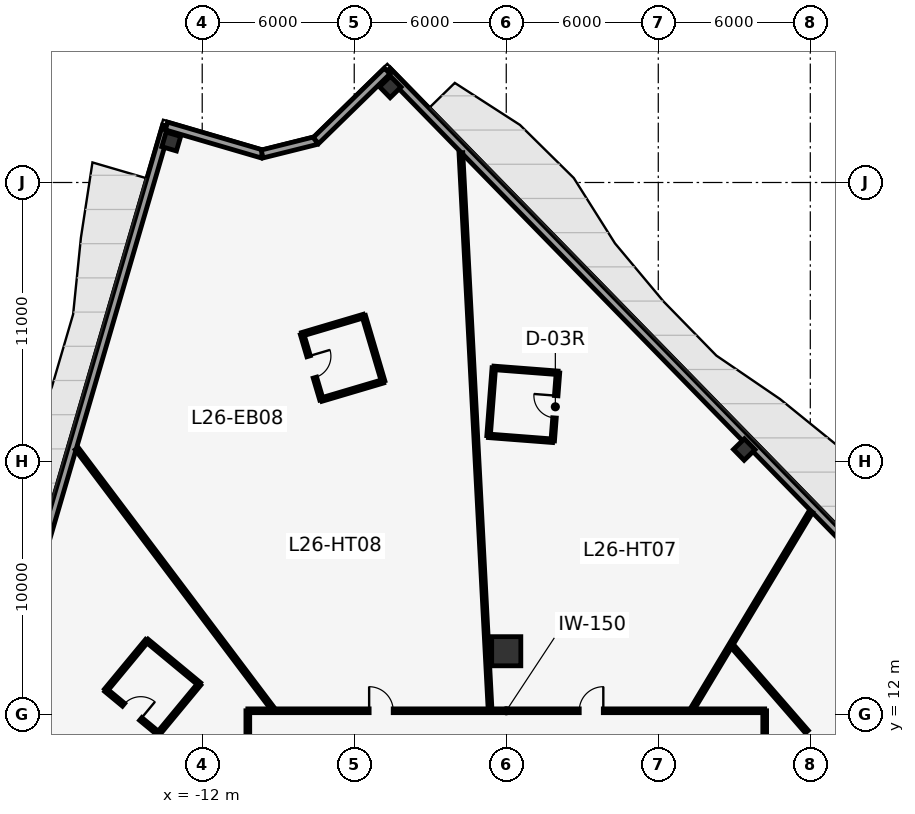
"""IFC4 building model, lengths in metres.
Left out: names, types, materials, properties, quantities, classifications, styles, units other than length and angle.
Written with IfcOpenShell. Run it as: python <this file> out.ifc"""

import sys

from ifc_helpers import new_model, si_unit, direction, frame, frame_2d, origin, origin_2d, place, context, subcontext, project, spatial, rectangle, hollow_rectangle, extrude, element, fill, save


model = new_model("IFC4")
c1 = context("Model", 3, precision=1e-05, world=origin(), true_north=direction((0.0, 1.0)))
c2 = subcontext(c1, "Body", "Model", "MODEL_VIEW")
j1 = project(units=[si_unit("LENGTHUNIT", "METRE"), si_unit("PLANEANGLEUNIT", "RADIAN")], contexts=[c1])
p1 = place(None, origin())
s1 = spatial("IfcSite", under=j1, at=p1, CompositionType="ELEMENT")
p2 = place(p1, origin())
s2 = spatial("IfcBuilding", under=s1, at=p2, CompositionType="ELEMENT")
p3 = place(p2, frame((0.0, 0.0, 115.0)))
s3 = spatial("IfcBuildingStorey", under=s2, at=p3, CompositionType="ELEMENT", Elevation=115.0)
p4 = place(p3, frame((0.0, 14.5, 0.0), z_axis=(0.0, 0.0, 1.0), x_axis=(1.0, 0.0, 0.0)))
e1 = element("IfcColumn", 1, at=p4, inside=s3, PredefinedType="COLUMN", context=c2, shape_type="SweptSolid", body=[
    extrude(rectangle(XDim=1.15, YDim=1.15, at=origin_2d()), origin(), (0.0, 0.0, 1.0), 4.0),
])
for number, where, z_axis, x_axis in (
    (2, (-13.221, 34.617, 0.0), (0.0, 0.0, 1.0), (0.281, 0.96, 0.0)),
    (3, (9.394, 22.461, 0.0), (0.0, 0.0, 1.0), (-0.699, 0.716, 0.0)),
    (4, (-4.578, 36.772, 0.0), (0.0, 0.0, 1.0), (-0.699, 0.716, 0.0)),
):
    element("IfcColumn", number, at=place(p3, frame(where, z_axis=z_axis, x_axis=x_axis)), inside=s3, PredefinedType="COLUMN", context=c2, shape_type="SweptSolid", body=[
        extrude(hollow_rectangle(XDim=0.6, YDim=0.6, WallThickness=0.04, at=origin_2d()), origin(), (0.0, 0.0, 1.0), 4.0),
    ])
p5 = place(p3, frame((-4.698, 37.402, 0.0), z_axis=(0.0, 0.0, 1.0), x_axis=(0.698490621109, -0.715619208954, 0.0)))
e5 = element("IfcWall", 5, at=p5, inside=s3, PredefinedType="STANDARD", context=c2, shape_type="SweptSolid", body=[
    extrude(rectangle(XDim=61.076, YDim=0.32, at=frame_2d((30.538, 0.0))), origin(), (0.0, 0.0, 1.0), 3.75),
])
p6 = place(p5, frame((30.038, 0.0, 0.0)))
e6 = element("IfcOpeningElement", 6, at=p6, cuts=e5, PredefinedType="OPENING", context=c2, shape_type="SweptSolid", body=[
    extrude(rectangle(XDim=1.0, YDim=2.15, at=frame_2d((0.5, 1.075))), frame((0.0, 0.17, 0.0), z_axis=(0.0, -1.0, 0.0), x_axis=(1.0, 0.0, 0.0)), (0.0, 0.0, 1.0), 0.34),
])
p7 = place(p3, frame((-30.559, -23.389, 0.0), z_axis=(0.0, 0.0, 1.0), x_axis=(0.280769703207, 0.95977516834, 0.0)))
e7 = element("IfcWall", 7, at=p7, inside=s3, PredefinedType="STANDARD", context=c2, shape_type="SweptSolid", body=[
    extrude(rectangle(XDim=61.076, YDim=0.32, at=frame_2d((30.538, 0.0))), origin(), (0.0, 0.0, 1.0), 3.75),
])
p8 = place(p7, frame((30.038, 0.0, 0.0)))
e8 = element("IfcOpeningElement", 8, at=p8, cuts=e7, PredefinedType="OPENING", context=c2, shape_type="SweptSolid", body=[
    extrude(rectangle(XDim=1.0, YDim=2.15, at=frame_2d((0.5, 1.075))), frame((0.0, 0.17, 0.0), z_axis=(0.0, -1.0, 0.0), x_axis=(1.0, 0.0, 0.0)), (0.0, 0.0, 1.0), 0.34),
])
p9 = place(p3, frame((-13.411, 35.229, 0.0), z_axis=(0.0, 0.0, 1.0), x_axis=(0.959788404321, -0.280724453747, 0.0)))
e9 = element("IfcWall", 9, at=p9, inside=s3, PredefinedType="STANDARD", context=c2, shape_type="SweptSolid", body=[
    extrude(rectangle(XDim=3.934, YDim=0.32, at=frame_2d((1.967, 0.0))), origin(), (0.0, 0.0, 1.0), 3.75),
])
p10 = place(p3, frame((-9.635, 34.125, 0.0), z_axis=(0.0, 0.0, 1.0), x_axis=(0.970306423964, 0.241878985475, 0.0)))
e10 = element("IfcWall", 10, at=p10, inside=s3, PredefinedType="STANDARD", context=c2, shape_type="SweptSolid", body=[
    extrude(rectangle(XDim=2.187, YDim=0.32, at=frame_2d((1.094, 0.0))), origin(), (0.0, 0.0, 1.0), 3.75),
])
p11 = place(p3, frame((-7.513, 34.654, 0.0), z_axis=(0.0, 0.0, 1.0), x_axis=(0.715620001602, 0.698489809022, 0.0)))
e11 = element("IfcWall", 11, at=p11, inside=s3, PredefinedType="STANDARD", context=c2, shape_type="SweptSolid", body=[
    extrude(rectangle(XDim=3.934, YDim=0.32, at=frame_2d((1.967, 0.0))), origin(), (0.0, 0.0, 1.0), 3.75),
])
p12 = place(p3, frame((-10.2, 12.15, 0.0), z_axis=(0.0, 0.0, 1.0), x_axis=(1.0, 0.0, 0.0)))
e12 = element("IfcWall", 12, at=p12, inside=s3, PredefinedType="PARTITIONING", context=c2, shape_type="SweptSolid", body=[
    extrude(rectangle(XDim=20.4, YDim=0.15, at=frame_2d((10.2, 0.0))), origin(), (0.0, 0.0, 1.0), 3.75),
])
p13 = place(p12, frame((13.081, 0.0, 0.0)))
e13 = element("IfcOpeningElement", 13, at=p13, cuts=e12, PredefinedType="OPENING", context=c2, shape_type="SweptSolid", body=[
    extrude(rectangle(XDim=0.95, YDim=2.15, at=frame_2d((0.475, 1.075))), frame((0.0, 0.085, 0.0), z_axis=(0.0, -1.0, 0.0), x_axis=(1.0, 0.0, 0.0)), (0.0, 0.0, 1.0), 0.17),
])
p14 = place(p12, frame((4.788, 0.0, 0.0)))
e14 = element("IfcOpeningElement", 14, at=p14, cuts=e12, PredefinedType="OPENING", context=c2, shape_type="SweptSolid", body=[
    extrude(rectangle(XDim=0.95, YDim=2.15, at=frame_2d((0.475, 1.075))), frame((0.0, 0.085, 0.0), z_axis=(0.0, -1.0, 0.0), x_axis=(1.0, 0.0, 0.0)), (0.0, 0.0, 1.0), 0.17),
])
p15 = place(p3, frame((10.2, 12.15, 0.0), z_axis=(0.0, 0.0, 1.0), x_axis=(0.0, -1.0, 0.0)))
e15 = element("IfcWall", 15, at=p15, inside=s3, PredefinedType="PARTITIONING", context=c2, shape_type="SweptSolid", body=[
    extrude(rectangle(XDim=24.0, YDim=0.15, at=frame_2d((12.0, 0.0))), origin(), (0.0, 0.0, 1.0), 3.75),
])
p16 = place(p15, frame((17.299, 0.0, 0.0)))
e16 = element("IfcOpeningElement", 16, at=p16, cuts=e15, PredefinedType="OPENING", context=c2, shape_type="SweptSolid", body=[
    extrude(rectangle(XDim=0.95, YDim=2.15, at=frame_2d((0.475, 1.075))), frame((0.0, 0.085, 0.0), z_axis=(0.0, -1.0, 0.0), x_axis=(1.0, 0.0, 0.0)), (0.0, 0.0, 1.0), 0.17),
])
p17 = place(p15, frame((10.092, 0.0, 0.0)))
e17 = element("IfcOpeningElement", 17, at=p17, cuts=e15, PredefinedType="OPENING", context=c2, shape_type="SweptSolid", body=[
    extrude(rectangle(XDim=0.95, YDim=2.15, at=frame_2d((0.475, 1.075))), frame((0.0, 0.085, 0.0), z_axis=(0.0, -1.0, 0.0), x_axis=(1.0, 0.0, 0.0)), (0.0, 0.0, 1.0), 0.17),
])
p18 = place(p15, frame((3.327, 0.0, 0.0)))
e18 = element("IfcOpeningElement", 18, at=p18, cuts=e15, PredefinedType="OPENING", context=c2, shape_type="SweptSolid", body=[
    extrude(rectangle(XDim=0.95, YDim=2.15, at=frame_2d((0.475, 1.075))), frame((0.0, 0.085, 0.0), z_axis=(0.0, -1.0, 0.0), x_axis=(1.0, 0.0, 0.0)), (0.0, 0.0, 1.0), 0.17),
])
p19 = place(p3, frame((-10.2, -11.85, 0.0), z_axis=(0.0, 0.0, 1.0), x_axis=(0.0, 1.0, 0.0)))
e19 = element("IfcWall", 19, at=p19, inside=s3, PredefinedType="PARTITIONING", context=c2, shape_type="SweptSolid", body=[
    extrude(rectangle(XDim=24.0, YDim=0.15, at=frame_2d((12.0, 0.0))), origin(), (0.0, 0.0, 1.0), 3.75),
])
p20 = place(p19, frame((5.187, 0.0, 0.0)))
e20 = element("IfcOpeningElement", 20, at=p20, cuts=e19, PredefinedType="OPENING", context=c2, shape_type="SweptSolid", body=[
    extrude(rectangle(XDim=0.95, YDim=2.15, at=frame_2d((0.475, 1.075))), frame((0.0, 0.085, 0.0), z_axis=(0.0, -1.0, 0.0), x_axis=(1.0, 0.0, 0.0)), (0.0, 0.0, 1.0), 0.17),
])
p21 = place(p19, frame((19.094, 0.0, 0.0)))
e21 = element("IfcOpeningElement", 21, at=p21, cuts=e19, PredefinedType="OPENING", context=c2, shape_type="SweptSolid", body=[
    extrude(rectangle(XDim=0.95, YDim=2.15, at=frame_2d((0.475, 1.075))), frame((0.0, 0.085, 0.0), z_axis=(0.0, -1.0, 0.0), x_axis=(1.0, 0.0, 0.0)), (0.0, 0.0, 1.0), 0.17),
])
p22 = place(p19, frame((11.767, 0.0, 0.0)))
e22 = element("IfcOpeningElement", 22, at=p22, cuts=e19, PredefinedType="OPENING", context=c2, shape_type="SweptSolid", body=[
    extrude(rectangle(XDim=0.95, YDim=2.15, at=frame_2d((0.475, 1.075))), frame((0.0, 0.085, 0.0), z_axis=(0.0, -1.0, 0.0), x_axis=(1.0, 0.0, 0.0)), (0.0, 0.0, 1.0), 0.17),
])
p23 = place(p3, frame((7.364, 12.255, 0.0), z_axis=(0.0, 0.0, 1.0), x_axis=(0.515030961147, 0.857171575042, 0.0)))
e23 = element("IfcWall", 23, at=p23, inside=s3, PredefinedType="PARTITIONING", context=c2, shape_type="SweptSolid", body=[
    extrude(rectangle(XDim=9.054, YDim=0.15, at=frame_2d((4.527, 0.0))), origin(), (0.0, 0.0, 1.0), 3.75),
])
p24 = place(p3, frame((-0.642, 12.255, 0.0), z_axis=(0.0, 0.0, 1.0), x_axis=(-0.052336972547, 0.998629481492, 0.0)))
e24 = element("IfcWall", 24, at=p24, inside=s3, PredefinedType="PARTITIONING", context=c2, shape_type="SweptSolid", body=[
    extrude(rectangle(XDim=21.948, YDim=0.15, at=frame_2d((10.974, 0.0))), origin(), (0.0, 0.0, 1.0), 2.798),
])
p25 = place(p3, frame((-9.235, 12.255, 0.0), z_axis=(0.0, 0.0, 1.0), x_axis=(-0.60180765782, 0.79864106017, 0.0)))
e25 = element("IfcWall", 25, at=p25, inside=s3, PredefinedType="PARTITIONING", context=c2, shape_type="SweptSolid", body=[
    extrude(rectangle(XDim=12.825, YDim=0.15, at=frame_2d((6.413, 0.0))), origin(), (0.0, 0.0, 1.0), 3.75),
])
p26 = place(p3, frame((15.428, 7.222, 0.0), z_axis=(0.0, 0.0, 1.0), x_axis=(-0.656028314667, 0.75473627868, 0.0)))
e26 = element("IfcWall", 26, at=p26, inside=s3, PredefinedType="PARTITIONING", context=c2, shape_type="SweptSolid", body=[
    extrude(rectangle(XDim=9.968, YDim=0.15, at=frame_2d((4.984, 0.0))), origin(), (0.0, 0.0, 1.0), 3.75),
])
p27 = place(p26, frame((4.534, 0.0, 0.0)))
e27 = element("IfcOpeningElement", 27, at=p27, cuts=e26, PredefinedType="OPENING", context=c2, shape_type="SweptSolid", body=[
    extrude(rectangle(XDim=0.9, YDim=2.1, at=frame_2d((0.45, 1.05))), frame((0.0, 0.085, 0.0), z_axis=(0.0, -1.0, 0.0), x_axis=(1.0, 0.0, 0.0)), (0.0, 0.0, 1.0), 0.17),
])
p28 = place(p3, frame((1.834, 22.806, 0.0), z_axis=(0.0, 0.0, 1.0), x_axis=(0.076696498885, 0.997054485502, 0.0)))
e28 = element("IfcWall", 28, at=p28, inside=s3, PredefinedType="PARTITIONING", context=c2, shape_type="SweptSolid", body=[
    extrude(rectangle(XDim=2.69, YDim=0.14, at=frame_2d((1.345, 0.0))), origin(), (0.0, 0.0, 1.0), 3.75),
])
p29 = place(p28, frame((0.905, 0.0, 0.0)))
e29 = element("IfcOpeningElement", 29, at=p29, cuts=e28, PredefinedType="OPENING", context=c2, shape_type="SweptSolid", body=[
    extrude(rectangle(XDim=0.88, YDim=2.1, at=frame_2d((0.44, 1.05))), frame((0.0, 0.08, 0.0), z_axis=(0.0, -1.0, 0.0), x_axis=(1.0, 0.0, 0.0)), (0.0, 0.0, 1.0), 0.16),
])
p30 = place(p3, frame((2.041, 25.488, 0.0), z_axis=(0.0, 0.0, 1.0), x_axis=(-0.997046564476, 0.076799402778, 0.0)))
e30 = element("IfcWall", 30, at=p30, inside=s3, PredefinedType="PARTITIONING", context=c2, shape_type="SweptSolid", body=[
    extrude(rectangle(XDim=2.54, YDim=0.14, at=frame_2d((1.27, 0.0))), origin(), (0.0, 0.0, 1.0), 3.75),
])
p31 = place(p3, frame((-0.492, 25.683, 0.0), z_axis=(0.0, 0.0, 1.0), x_axis=(-0.076689558651, -0.997055019341, 0.0)))
e31 = element("IfcWall", 31, at=p31, inside=s3, PredefinedType="PARTITIONING", context=c2, shape_type="SweptSolid", body=[
    extrude(rectangle(XDim=2.69, YDim=0.14, at=frame_2d((1.345, 0.0))), origin(), (0.0, 0.0, 1.0), 3.75),
])
p32 = place(p3, frame((-0.698, 23.001, 0.0), z_axis=(0.0, 0.0, 1.0), x_axis=(0.997053920062, -0.076703849244, 0.0)))
e32 = element("IfcWall", 32, at=p32, inside=s3, PredefinedType="PARTITIONING", context=c2, shape_type="SweptSolid", body=[
    extrude(rectangle(XDim=2.54, YDim=0.14, at=frame_2d((1.27, 0.0))), origin(), (0.0, 0.0, 1.0), 3.75),
])
p33 = place(p3, frame((-4.859, 25.153, 0.0), z_axis=(0.0, 0.0, 1.0), x_axis=(-0.283973996327, 0.958831981846, 0.0)))
e33 = element("IfcWall", 33, at=p33, inside=s3, PredefinedType="PARTITIONING", context=c2, shape_type="SweptSolid", body=[
    extrude(rectangle(XDim=2.69, YDim=0.14, at=frame_2d((1.345, 0.0))), origin(), (0.0, 0.0, 1.0), 3.75),
])
p34 = place(p3, frame((-5.623, 27.732, 0.0), z_axis=(0.0, 0.0, 1.0), x_axis=(-0.95881265696, -0.284039238227, 0.0)))
e34 = element("IfcWall", 34, at=p34, inside=s3, PredefinedType="PARTITIONING", context=c2, shape_type="SweptSolid", body=[
    extrude(rectangle(XDim=2.54, YDim=0.14, at=frame_2d((1.27, 0.0))), origin(), (0.0, 0.0, 1.0), 3.75),
])
p35 = place(p3, frame((-8.058, 27.01, 0.0), z_axis=(0.0, 0.0, 1.0), x_axis=(0.283973996327, -0.958831981846, 0.0)))
e35 = element("IfcWall", 35, at=p35, inside=s3, PredefinedType="PARTITIONING", context=c2, shape_type="SweptSolid", body=[
    extrude(rectangle(XDim=2.69, YDim=0.14, at=frame_2d((1.345, 0.0))), origin(), (0.0, 0.0, 1.0), 3.75),
])
p36 = place(p35, frame((0.905, 0.0, 0.0)))
e36 = element("IfcOpeningElement", 36, at=p36, cuts=e35, PredefinedType="OPENING", context=c2, shape_type="SweptSolid", body=[
    extrude(rectangle(XDim=0.88, YDim=2.1, at=frame_2d((0.44, 1.05))), frame((0.0, 0.08, 0.0), z_axis=(0.0, -1.0, 0.0), x_axis=(1.0, 0.0, 0.0)), (0.0, 0.0, 1.0), 0.16),
])
p37 = place(p3, frame((-7.294, 24.431, 0.0), z_axis=(0.0, 0.0, 1.0), x_axis=(0.95881265696, 0.284039238227, 0.0)))
e37 = element("IfcWall", 37, at=p37, inside=s3, PredefinedType="PARTITIONING", context=c2, shape_type="SweptSolid", body=[
    extrude(rectangle(XDim=2.54, YDim=0.14, at=frame_2d((1.27, 0.0))), origin(), (0.0, 0.0, 1.0), 3.75),
])
p38 = place(p3, frame((-12.11, 13.207, 0.0), z_axis=(0.0, 0.0, 1.0), x_axis=(-0.770537260361, 0.637394956362, 0.0)))
e38 = element("IfcWall", 38, at=p38, inside=s3, PredefinedType="PARTITIONING", context=c2, shape_type="SweptSolid", body=[
    extrude(rectangle(XDim=2.69, YDim=0.14, at=frame_2d((1.345, 0.0))), origin(), (0.0, 0.0, 1.0), 3.75),
])
p39 = place(p3, frame((-14.183, 14.921, 0.0), z_axis=(0.0, 0.0, 1.0), x_axis=(-0.63745754777, -0.770485479935, 0.0)))
e39 = element("IfcWall", 39, at=p39, inside=s3, PredefinedType="PARTITIONING", context=c2, shape_type="SweptSolid", body=[
    extrude(rectangle(XDim=2.54, YDim=0.14, at=frame_2d((1.27, 0.0))), origin(), (0.0, 0.0, 1.0), 3.75),
])
p40 = place(p3, frame((-15.802, 12.964, 0.0), z_axis=(0.0, 0.0, 1.0), x_axis=(0.770537260361, -0.637394956362, 0.0)))
e40 = element("IfcWall", 40, at=p40, inside=s3, PredefinedType="PARTITIONING", context=c2, shape_type="SweptSolid", body=[
    extrude(rectangle(XDim=2.69, YDim=0.14, at=frame_2d((1.345, 0.0))), origin(), (0.0, 0.0, 1.0), 3.75),
])
p41 = place(p40, frame((0.905, 0.0, 0.0)))
e41 = element("IfcOpeningElement", 41, at=p41, cuts=e40, PredefinedType="OPENING", context=c2, shape_type="SweptSolid", body=[
    extrude(rectangle(XDim=0.88, YDim=2.1, at=frame_2d((0.44, 1.05))), frame((0.0, 0.08, 0.0), z_axis=(0.0, -1.0, 0.0), x_axis=(1.0, 0.0, 0.0)), (0.0, 0.0, 1.0), 0.16),
])
p42 = place(p3, frame((-13.729, 11.25, 0.0), z_axis=(0.0, 0.0, 1.0), x_axis=(0.63745754777, 0.770485479935, 0.0)))
e42 = element("IfcWall", 42, at=p42, inside=s3, PredefinedType="PARTITIONING", context=c2, shape_type="SweptSolid", body=[
    extrude(rectangle(XDim=2.54, YDim=0.14, at=frame_2d((1.27, 0.0))), origin(), (0.0, 0.0, 1.0), 3.75),
])
p43 = place(p27, origin())
e43 = element("IfcDoor", 43, at=p43, inside=s3, OperationType="SINGLE_SWING_LEFT", PredefinedType="DOOR", context=c2, shape_type="SweptSolid", body=[
    extrude(rectangle(XDim=0.9, YDim=2.1, at=frame_2d((0.45, 1.05))), frame((0.0, 0.025, 0.0), z_axis=(0.0, -1.0, 0.0), x_axis=(1.0, 0.0, 0.0)), (0.0, 0.0, 1.0), 0.05),
])
fill(e27, e43)
p44 = place(p29, origin())
e44 = element("IfcDoor", 44, at=p44, inside=s3, OperationType="SINGLE_SWING_RIGHT", PredefinedType="DOOR", context=c2, shape_type="SweptSolid", body=[
    extrude(rectangle(XDim=0.88, YDim=2.1, at=frame_2d((0.44, 1.05))), frame((0.0, 0.025, 0.0), z_axis=(0.0, -1.0, 0.0), x_axis=(1.0, 0.0, 0.0)), (0.0, 0.0, 1.0), 0.05),
])
fill(e29, e44)
p45 = place(p36, origin())
e45 = element("IfcDoor", 45, at=p45, inside=s3, OperationType="SINGLE_SWING_LEFT", PredefinedType="DOOR", context=c2, shape_type="SweptSolid", body=[
    extrude(rectangle(XDim=0.88, YDim=2.1, at=frame_2d((0.44, 1.05))), frame((0.0, 0.025, 0.0), z_axis=(0.0, -1.0, 0.0), x_axis=(1.0, 0.0, 0.0)), (0.0, 0.0, 1.0), 0.05),
])
fill(e36, e45)
p46 = place(p41, origin())
e46 = element("IfcDoor", 46, at=p46, inside=s3, OperationType="SINGLE_SWING_RIGHT", PredefinedType="DOOR", context=c2, shape_type="SweptSolid", body=[
    extrude(rectangle(XDim=0.88, YDim=2.1, at=frame_2d((0.44, 1.05))), frame((0.0, 0.025, 0.0), z_axis=(0.0, -1.0, 0.0), x_axis=(1.0, 0.0, 0.0)), (0.0, 0.0, 1.0), 0.05),
])
fill(e41, e46)
p47 = place(p13, origin())
e47 = element("IfcDoor", 47, at=p47, inside=s3, OperationType="SINGLE_SWING_RIGHT", PredefinedType="DOOR", context=c2, shape_type="SweptSolid", body=[
    extrude(rectangle(XDim=0.95, YDim=2.15, at=frame_2d((0.475, 1.075))), frame((0.0, 0.025, 0.0), z_axis=(0.0, -1.0, 0.0), x_axis=(1.0, 0.0, 0.0)), (0.0, 0.0, 1.0), 0.05),
])
fill(e13, e47)
p48 = place(p14, origin())
e48 = element("IfcDoor", 48, at=p48, inside=s3, OperationType="SINGLE_SWING_LEFT", PredefinedType="DOOR", context=c2, shape_type="SweptSolid", body=[
    extrude(rectangle(XDim=0.95, YDim=2.15, at=frame_2d((0.475, 1.075))), frame((0.0, 0.025, 0.0), z_axis=(0.0, -1.0, 0.0), x_axis=(1.0, 0.0, 0.0)), (0.0, 0.0, 1.0), 0.05),
])
fill(e14, e48)
save(model, sys.argv[1])
